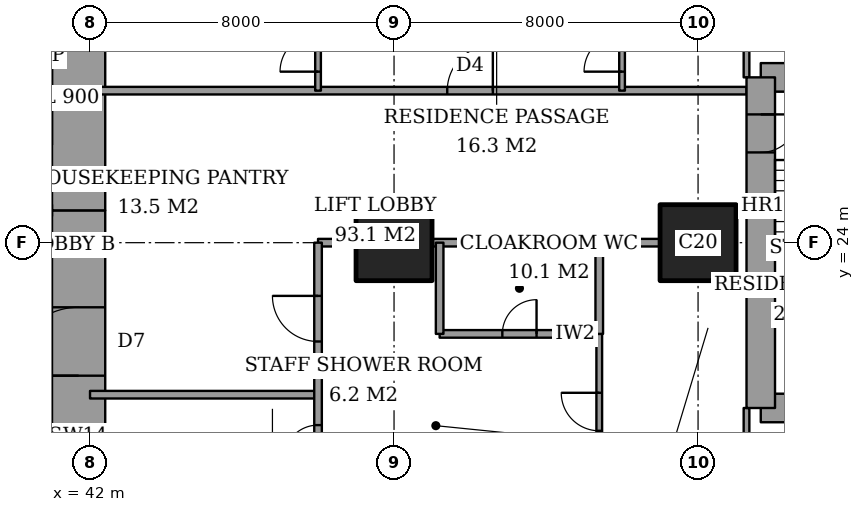
"""IFC4 building model, lengths in metres.
Left out: names, types, materials, properties, quantities, classifications, styles, units other than length and angle.
Written with IfcOpenShell. Run it as: python <this file> out.ifc"""

import sys

from ifc_helpers import new_model, si_unit, direction, frame, frame_2d, origin, origin_2d, place, context, subcontext, project, spatial, rectangle, extrude, element, fill, save


model = new_model("IFC4")
c1 = context("Model", 3, precision=1e-05, world=origin(), true_north=direction((0.0, 1.0)))
c2 = subcontext(c1, "Body", "Model", "MODEL_VIEW")
j1 = project(units=[si_unit("LENGTHUNIT", "METRE"), si_unit("PLANEANGLEUNIT", "RADIAN")], contexts=[c1])
p1 = place(None, origin())
s1 = spatial("IfcSite", under=j1, at=p1, CompositionType="ELEMENT")
p2 = place(p1, origin())
s2 = spatial("IfcBuilding", under=s1, at=p2, CompositionType="ELEMENT")
p3 = place(p2, frame((0.0, 0.0, 157.4)))
s3 = spatial("IfcBuildingStorey", under=s2, at=p3, CompositionType="ELEMENT", Elevation=157.4)
for number, where, z_axis, x_axis in (
    (1, (50.0, 24.0, 0.0), (0.0, 0.0, 1.0), (1.0, 0.0, 0.0)),
    (2, (58.0, 24.0, 0.0), (0.0, 0.0, 1.0), (1.0, 0.0, 0.0)),
):
    element("IfcColumn", number, at=place(p3, frame(where, z_axis=z_axis, x_axis=x_axis)), inside=s3, PredefinedType="COLUMN", context=c2, shape_type="SweptSolid", body=[
        extrude(rectangle(XDim=2.0, YDim=2.0, at=origin_2d()), origin(), (0.0, 0.0, 1.0), 3.6),
    ])
p4 = place(p3, frame((41.7, 13.0, 0.0), z_axis=(0.0, 0.0, 1.0), x_axis=(0.0, 1.0, 0.0)))
e3 = element("IfcWall", 3, at=p4, inside=s3, PredefinedType="SHEAR", context=c2, shape_type="SweptSolid", body=[
    extrude(rectangle(XDim=11.85, YDim=1.4, at=frame_2d((5.925, 0.0))), origin(), (0.0, 0.0, 1.0), 3.6),
])
p5 = place(p4, frame((7.5, 0.0, 0.0)))
e4 = element("IfcOpeningElement", 4, at=p5, cuts=e3, PredefinedType="OPENING", context=c2, shape_type="SweptSolid", body=[
    extrude(rectangle(XDim=1.8, YDim=2.4, at=frame_2d((0.9, 1.2))), frame((0.0, 0.71, 0.0), z_axis=(0.0, -1.0, 0.0), x_axis=(1.0, 0.0, 0.0)), (0.0, 0.0, 1.0), 1.42),
])
p6 = place(p3, frame((41.7, 24.85, 0.0), z_axis=(0.0, 0.0, 1.0), x_axis=(0.0, 1.0, 0.0)))
e5 = element("IfcWall", 5, at=p6, inside=s3, PredefinedType="SHEAR", context=c2, shape_type="SweptSolid", body=[
    extrude(rectangle(XDim=10.15, YDim=1.4, at=frame_2d((5.075, 0.0))), origin(), (0.0, 0.0, 1.0), 3.6),
])
for number, where, z_axis, x_axis in (
    (6, (59.65, 19.65, 0.0), (0.0, 0.0, 1.0), (1.0, 0.0, 0.0)),
    (7, (64.1, 28.35, 0.0), (0.0, 0.0, 1.0), (-1.0, 0.0, 0.0)),
):
    element("IfcWall", number, at=place(p3, frame(where, z_axis=z_axis, x_axis=x_axis)), inside=s3, PredefinedType="SHEAR", context=c2, shape_type="SweptSolid", body=[
        extrude(rectangle(XDim=4.45, YDim=0.75, at=frame_2d((2.225, 0.0))), origin(), (0.0, 0.0, 1.0), 3.6),
    ])
p7 = place(p3, frame((59.65, 28.35, 0.0), z_axis=(0.0, 0.0, 1.0), x_axis=(0.0, -1.0, 0.0)))
e8 = element("IfcWall", 8, at=p7, inside=s3, PredefinedType="SHEAR", context=c2, shape_type="SweptSolid", body=[
    extrude(rectangle(XDim=8.7, YDim=0.75, at=frame_2d((4.35, 0.0))), origin(), (0.0, 0.0, 1.0), 3.6),
])
p8 = place(p7, frame((0.975, 0.0, 0.0)))
e9 = element("IfcOpeningElement", 9, at=p8, cuts=e8, PredefinedType="OPENING", context=c2, shape_type="SweptSolid", body=[
    extrude(rectangle(XDim=1.0, YDim=2.1, at=frame_2d((0.5, 1.05))), frame((0.0, 0.385, 0.0), z_axis=(0.0, -1.0, 0.0), x_axis=(1.0, 0.0, 0.0)), (0.0, 0.0, 1.0), 0.77),
])
p9 = place(p3, frame((42.0, 20.0, 0.0), z_axis=(0.0, 0.0, 1.0), x_axis=(1.0, 0.0, 0.0)))
e10 = element("IfcWall", 10, at=p9, inside=s3, PredefinedType="PARTITIONING", context=c2, shape_type="SweptSolid", body=[
    extrude(rectangle(XDim=6.0, YDim=0.2, at=frame_2d((3.0, 0.0))), origin(), (0.0, 0.0, 1.0), 3.35),
])
p10 = place(p3, frame((51.2, 21.6, 0.0), z_axis=(0.0, 0.0, 1.0), x_axis=(1.0, 0.0, 0.0)))
e11 = element("IfcWall", 11, at=p10, inside=s3, PredefinedType="PARTITIONING", context=c2, shape_type="SweptSolid", body=[
    extrude(rectangle(XDim=4.2, YDim=0.2, at=frame_2d((2.1, 0.0))), origin(), (0.0, 0.0, 1.0), 3.35),
])
p11 = place(p10, frame((1.65, 0.0, 0.0)))
e12 = element("IfcOpeningElement", 12, at=p11, cuts=e11, PredefinedType="OPENING", context=c2, shape_type="SweptSolid", body=[
    extrude(rectangle(XDim=0.9, YDim=2.1, at=frame_2d((0.45, 1.05))), frame((0.0, 0.11, 0.0), z_axis=(0.0, -1.0, 0.0), x_axis=(1.0, 0.0, 0.0)), (0.0, 0.0, 1.0), 0.22),
])
p12 = place(p3, frame((48.0, 24.0, 0.0), z_axis=(0.0, 0.0, 1.0), x_axis=(1.0, 0.0, 0.0)))
e13 = element("IfcWall", 13, at=p12, inside=s3, PredefinedType="PARTITIONING", context=c2, shape_type="SweptSolid", body=[
    extrude(rectangle(XDim=1.0, YDim=0.2, at=frame_2d((0.5, 0.0))), origin(), (0.0, 0.0, 1.0), 3.35),
])
p13 = place(p3, frame((51.0, 24.0, 0.0), z_axis=(0.0, 0.0, 1.0), x_axis=(1.0, 0.0, 0.0)))
e14 = element("IfcWall", 14, at=p13, inside=s3, PredefinedType="PARTITIONING", context=c2, shape_type="SweptSolid", body=[
    extrude(rectangle(XDim=6.0, YDim=0.2, at=frame_2d((3.0, 0.0))), origin(), (0.0, 0.0, 1.0), 3.35),
])
p14 = place(p3, frame((42.0, 28.0, 0.0), z_axis=(0.0, 0.0, 1.0), x_axis=(1.0, 0.0, 0.0)))
e15 = element("IfcWall", 15, at=p14, inside=s3, PredefinedType="PARTITIONING", context=c2, shape_type="SweptSolid", body=[
    extrude(rectangle(XDim=17.275, YDim=0.2, at=frame_2d((8.637, 0.0))), origin(), (0.0, 0.0, 1.0), 3.35),
])
p15 = place(p14, frame((9.4, 0.0, 0.0)))
e16 = element("IfcOpeningElement", 16, at=p15, cuts=e15, PredefinedType="OPENING", context=c2, shape_type="SweptSolid", body=[
    extrude(rectangle(XDim=1.2, YDim=2.4, at=frame_2d((0.6, 1.2))), frame((0.0, 0.11, 0.0), z_axis=(0.0, -1.0, 0.0), x_axis=(1.0, 0.0, 0.0)), (0.0, 0.0, 1.0), 0.22),
])
p16 = place(p3, frame((48.0, 17.5, 0.0), z_axis=(0.0, 0.0, 1.0), x_axis=(0.0, 1.0, 0.0)))
e17 = element("IfcWall", 17, at=p16, inside=s3, PredefinedType="PARTITIONING", context=c2, shape_type="SweptSolid", body=[
    extrude(rectangle(XDim=6.5, YDim=0.2, at=frame_2d((3.25, 0.0))), origin(), (0.0, 0.0, 1.0), 3.35),
])
p17 = place(p16, frame((3.9, 0.0, 0.0)))
e18 = element("IfcOpeningElement", 18, at=p17, cuts=e17, PredefinedType="OPENING", context=c2, shape_type="SweptSolid", body=[
    extrude(rectangle(XDim=1.2, YDim=2.4, at=frame_2d((0.6, 1.2))), frame((0.0, 0.11, 0.0), z_axis=(0.0, -1.0, 0.0), x_axis=(1.0, 0.0, 0.0)), (0.0, 0.0, 1.0), 0.22),
])
p18 = place(p16, frame((0.8, 0.0, 0.0)))
e19 = element("IfcOpeningElement", 19, at=p18, cuts=e17, PredefinedType="OPENING", context=c2, shape_type="SweptSolid", body=[
    extrude(rectangle(XDim=0.9, YDim=2.1, at=frame_2d((0.45, 1.05))), frame((0.0, 0.11, 0.0), z_axis=(0.0, -1.0, 0.0), x_axis=(1.0, 0.0, 0.0)), (0.0, 0.0, 1.0), 0.22),
])
p19 = place(p3, frame((48.0, 28.0, 0.0), z_axis=(0.0, 0.0, 1.0), x_axis=(0.0, 1.0, 0.0)))
e20 = element("IfcWall", 20, at=p19, inside=s3, PredefinedType="PARTITIONING", context=c2, shape_type="SweptSolid", body=[
    extrude(rectangle(XDim=9.4, YDim=0.15, at=frame_2d((4.7, 0.0))), origin(), (0.0, 0.0, 1.0), 3.35),
])
p20 = place(p19, frame((0.5, 0.0, 0.0)))
e21 = element("IfcOpeningElement", 21, at=p20, cuts=e20, PredefinedType="OPENING", context=c2, shape_type="SweptSolid", body=[
    extrude(rectangle(XDim=1.0, YDim=2.1, at=frame_2d((0.5, 1.05))), frame((0.0, 0.085, 0.0), z_axis=(0.0, -1.0, 0.0), x_axis=(1.0, 0.0, 0.0)), (0.0, 0.0, 1.0), 0.17),
])
for number, where, z_axis, x_axis in (
    (22, (51.2, 21.6, 0.0), (0.0, 0.0, 1.0), (0.0, 1.0, 0.0)),
    (23, (55.4, 21.6, 0.0), (0.0, 0.0, 1.0), (0.0, 1.0, 0.0)),
):
    element("IfcWall", number, at=place(p3, frame(where, z_axis=z_axis, x_axis=x_axis)), inside=s3, PredefinedType="PARTITIONING", context=c2, shape_type="SweptSolid", body=[
        extrude(rectangle(XDim=2.4, YDim=0.2, at=frame_2d((1.2, 0.0))), origin(), (0.0, 0.0, 1.0), 3.35),
    ])
p21 = place(p3, frame((55.4, 11.0, 0.0), z_axis=(0.0, 0.0, 1.0), x_axis=(0.0, 1.0, 0.0)))
e24 = element("IfcWall", 24, at=p21, inside=s3, PredefinedType="PARTITIONING", context=c2, shape_type="SweptSolid", body=[
    extrude(rectangle(XDim=10.6, YDim=0.15, at=frame_2d((5.3, 0.0))), origin(), (0.0, 0.0, 1.0), 3.35),
])
p22 = place(p21, frame((8.05, 0.0, 0.0)))
e25 = element("IfcOpeningElement", 25, at=p22, cuts=e24, PredefinedType="OPENING", context=c2, shape_type="SweptSolid", body=[
    extrude(rectangle(XDim=1.0, YDim=2.1, at=frame_2d((0.5, 1.05))), frame((0.0, 0.085, 0.0), z_axis=(0.0, -1.0, 0.0), x_axis=(1.0, 0.0, 0.0)), (0.0, 0.0, 1.0), 0.17),
])
p23 = place(p3, frame((56.0, 28.0, 0.0), z_axis=(0.0, 0.0, 1.0), x_axis=(0.0, 1.0, 0.0)))
e26 = element("IfcWall", 26, at=p23, inside=s3, PredefinedType="PARTITIONING", context=c2, shape_type="SweptSolid", body=[
    extrude(rectangle(XDim=9.4, YDim=0.15, at=frame_2d((4.7, 0.0))), origin(), (0.0, 0.0, 1.0), 3.35),
])
p24 = place(p23, frame((0.5, 0.0, 0.0)))
e27 = element("IfcOpeningElement", 27, at=p24, cuts=e26, PredefinedType="OPENING", context=c2, shape_type="SweptSolid", body=[
    extrude(rectangle(XDim=1.0, YDim=2.1, at=frame_2d((0.5, 1.05))), frame((0.0, 0.085, 0.0), z_axis=(0.0, -1.0, 0.0), x_axis=(1.0, 0.0, 0.0)), (0.0, 0.0, 1.0), 0.17),
])
p25 = place(p3, frame((59.275, 17.2, 0.0), z_axis=(0.0, 0.0, 1.0), x_axis=(0.0, 1.0, 0.0)))
e28 = element("IfcWall", 28, at=p25, inside=s3, PredefinedType="PARTITIONING", context=c2, shape_type="SweptSolid", body=[
    extrude(rectangle(XDim=2.45, YDim=0.15, at=frame_2d((1.225, 0.0))), origin(), (0.0, 0.0, 1.0), 3.35),
])
p26 = place(p25, frame((0.587, 0.0, 0.0)))
e29 = element("IfcOpeningElement", 29, at=p26, cuts=e28, PredefinedType="OPENING", context=c2, shape_type="SweptSolid", body=[
    extrude(rectangle(XDim=0.9, YDim=2.1, at=frame_2d((0.45, 1.05))), frame((0.0, 0.085, 0.0), z_axis=(0.0, -1.0, 0.0), x_axis=(1.0, 0.0, 0.0)), (0.0, 0.0, 1.0), 0.17),
])
p27 = place(p3, frame((59.275, 28.35, 0.0), z_axis=(0.0, 0.0, 1.0), x_axis=(0.0, 1.0, 0.0)))
e30 = element("IfcWall", 30, at=p27, inside=s3, PredefinedType="PARTITIONING", context=c2, shape_type="SweptSolid", body=[
    extrude(rectangle(XDim=2.45, YDim=0.15, at=frame_2d((1.225, 0.0))), origin(), (0.0, 0.0, 1.0), 3.35),
])
p28 = place(p27, frame((0.913, 0.0, 0.0)))
e31 = element("IfcOpeningElement", 31, at=p28, cuts=e30, PredefinedType="OPENING", context=c2, shape_type="SweptSolid", body=[
    extrude(rectangle(XDim=1.0, YDim=2.1, at=frame_2d((0.5, 1.05))), frame((0.0, 0.085, 0.0), z_axis=(0.0, -1.0, 0.0), x_axis=(1.0, 0.0, 0.0)), (0.0, 0.0, 1.0), 0.17),
])
p29 = place(p22, origin())
e32 = element("IfcDoor", 32, at=p29, inside=s3, OperationType="SINGLE_SWING_LEFT", PredefinedType="DOOR", context=c2, shape_type="SweptSolid", body=[
    extrude(rectangle(XDim=1.0, YDim=2.1, at=frame_2d((0.5, 1.05))), frame((0.0, 0.025, 0.0), z_axis=(0.0, -1.0, 0.0), x_axis=(1.0, 0.0, 0.0)), (0.0, 0.0, 1.0), 0.05),
])
fill(e25, e32)
p30 = place(p11, origin())
e33 = element("IfcDoor", 33, at=p30, inside=s3, OperationType="SINGLE_SWING_LEFT", PredefinedType="DOOR", context=c2, shape_type="SweptSolid", body=[
    extrude(rectangle(XDim=0.9, YDim=2.1, at=frame_2d((0.45, 1.05))), frame((0.0, 0.025, 0.0), z_axis=(0.0, -1.0, 0.0), x_axis=(1.0, 0.0, 0.0)), (0.0, 0.0, 1.0), 0.05),
])
fill(e12, e33)
p31 = place(p17, origin())
e34 = element("IfcDoor", 34, at=p31, inside=s3, OperationType="SINGLE_SWING_LEFT", PredefinedType="DOOR", context=c2, shape_type="SweptSolid", body=[
    extrude(rectangle(XDim=1.2, YDim=2.4, at=frame_2d((0.6, 1.2))), frame((0.0, 0.025, 0.0), z_axis=(0.0, -1.0, 0.0), x_axis=(1.0, 0.0, 0.0)), (0.0, 0.0, 1.0), 0.05),
])
fill(e18, e34)
p32 = place(p18, origin())
e35 = element("IfcDoor", 35, at=p32, inside=s3, OperationType="SINGLE_SWING_RIGHT", PredefinedType="DOOR", context=c2, shape_type="SweptSolid", body=[
    extrude(rectangle(XDim=0.9, YDim=2.1, at=frame_2d((0.45, 1.05))), frame((0.0, 0.025, 0.0), z_axis=(0.0, -1.0, 0.0), x_axis=(1.0, 0.0, 0.0)), (0.0, 0.0, 1.0), 0.05),
])
fill(e19, e35)
p33 = place(p24, origin())
e36 = element("IfcDoor", 36, at=p33, inside=s3, OperationType="SINGLE_SWING_RIGHT", PredefinedType="DOOR", context=c2, shape_type="SweptSolid", body=[
    extrude(rectangle(XDim=1.0, YDim=2.1, at=frame_2d((0.5, 1.05))), frame((0.0, 0.025, 0.0), z_axis=(0.0, -1.0, 0.0), x_axis=(1.0, 0.0, 0.0)), (0.0, 0.0, 1.0), 0.05),
])
fill(e27, e36)
p34 = place(p15, origin())
e37 = element("IfcDoor", 37, at=p34, inside=s3, OperationType="SINGLE_SWING_LEFT", PredefinedType="DOOR", context=c2, shape_type="SweptSolid", body=[
    extrude(rectangle(XDim=1.2, YDim=2.4, at=frame_2d((0.6, 1.2))), frame((0.0, 0.025, 0.0), z_axis=(0.0, -1.0, 0.0), x_axis=(1.0, 0.0, 0.0)), (0.0, 0.0, 1.0), 0.05),
])
fill(e16, e37)
p35 = place(p20, origin())
e38 = element("IfcDoor", 38, at=p35, inside=s3, OperationType="SINGLE_SWING_RIGHT", PredefinedType="DOOR", context=c2, shape_type="SweptSolid", body=[
    extrude(rectangle(XDim=1.0, YDim=2.1, at=frame_2d((0.5, 1.05))), frame((0.0, 0.025, 0.0), z_axis=(0.0, -1.0, 0.0), x_axis=(1.0, 0.0, 0.0)), (0.0, 0.0, 1.0), 0.05),
])
fill(e21, e38)
p36 = place(p5, origin())
e39 = element("IfcDoor", 39, at=p36, inside=s3, OperationType="DOUBLE_DOOR_DOUBLE_SWING", PredefinedType="DOOR", context=c2, shape_type="SweptSolid", body=[
    extrude(rectangle(XDim=1.8, YDim=2.4, at=frame_2d((0.9, 1.2))), frame((0.0, 0.025, 0.0), z_axis=(0.0, -1.0, 0.0), x_axis=(1.0, 0.0, 0.0)), (0.0, 0.0, 1.0), 0.05),
])
fill(e4, e39)
p37 = place(p8, origin())
e40 = element("IfcDoor", 40, at=p37, inside=s3, OperationType="SINGLE_SWING_RIGHT", PredefinedType="DOOR", context=c2, shape_type="SweptSolid", body=[
    extrude(rectangle(XDim=1.0, YDim=2.1, at=frame_2d((0.5, 1.05))), frame((0.0, 0.025, 0.0), z_axis=(0.0, -1.0, 0.0), x_axis=(1.0, 0.0, 0.0)), (0.0, 0.0, 1.0), 0.05),
])
fill(e9, e40)
save(model, sys.argv[1])
